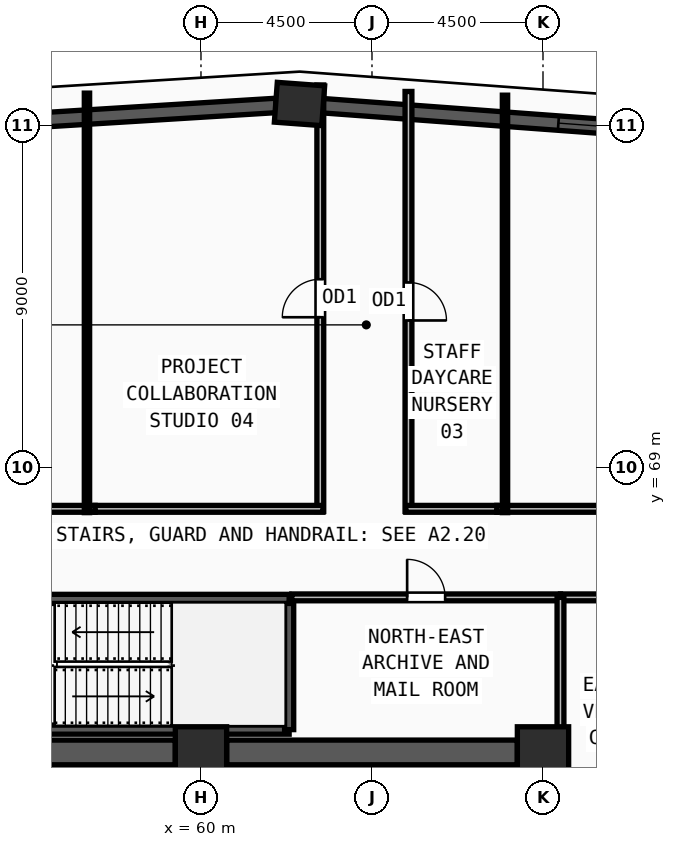
"""IFC4 building model, lengths in metres.
Left out: names, types, materials, properties, quantities, classifications, styles, units other than length and angle.
Written with IfcOpenShell. Run it as: python <this file> out.ifc"""

import sys

from ifc_helpers import new_model, si_unit, direction, frame, frame_2d, origin, origin_2d, place, context, subcontext, project, spatial, rectangle, extrude, source, transform, mapped, element, fill, save


model = new_model("IFC4")
c1 = context("Model", 3, precision=1e-05, world=origin(), true_north=direction((0.0, 1.0)))
c2 = subcontext(c1, "Body", "Model", "MODEL_VIEW")
j1 = project(units=[si_unit("LENGTHUNIT", "METRE"), si_unit("PLANEANGLEUNIT", "RADIAN")], contexts=[c1])
p1 = place(None, origin())
s1 = spatial("IfcSite", under=j1, at=p1, CompositionType="ELEMENT")
p2 = place(p1, origin())
s2 = spatial("IfcBuilding", under=s1, at=p2, CompositionType="ELEMENT")
p3 = place(p2, frame((0.0, 0.0, 201.75)))
s3 = spatial("IfcBuildingStorey", under=s2, at=p3, CompositionType="ELEMENT", Elevation=201.75)
m1 = source(origin(), c2, "Body", "SweptSolid", [
    extrude(rectangle(XDim=1.35, YDim=1.35, at=origin_2d()), origin(), (0.0, 0.0, 1.0), 3.75),
])
for number, where, z_axis, x_axis in (
    (1, (69.0, 61.5, 0.0), (0.0, 0.0, 1.0), (1.0, 0.0, 0.0)),
    (2, (60.0, 61.5, 0.0), (0.0, 0.0, 1.0), (1.0, 0.0, 0.0)),
):
    element("IfcColumn", number, at=place(p3, frame(where, z_axis=z_axis, x_axis=x_axis)), inside=s3, PredefinedType="COLUMN", context=c2, shape_type="MappedRepresentation", body=[
        mapped(m1, transform((0.0, 0.0, 0.0), x_axis=(1.0, 0.0, 0.0), y_axis=(0.0, 1.0, 0.0), z_axis=(0.0, 0.0, 1.0), scale=1.0)),
    ])
m2 = source(origin(), c2, "Body", "SweptSolid", [
    extrude(rectangle(XDim=1.25, YDim=1.05, at=origin_2d()), origin(), (0.0, 0.0, 1.0), 3.75),
])
p4 = place(p3, frame((62.593, 78.562, 0.0), z_axis=(0.0, 0.0, 1.0), x_axis=(-0.997288851512, 0.073586321085, 0.0)))
e3 = element("IfcColumn", 3, at=p4, inside=s3, PredefinedType="COLUMN", context=c2, shape_type="MappedRepresentation", body=[
    mapped(m2, transform((0.0, 0.0, 0.0), x_axis=(1.0, 0.0, 0.0), y_axis=(0.0, 1.0, 0.0), z_axis=(0.0, 0.0, 1.0), scale=1.0)),
])
p5 = place(p3, frame((87.605, 76.715, 0.0), z_axis=(0.0, 0.0, 1.0), x_axis=(-0.997283768188, 0.073655181142, 0.0)))
e4 = element("IfcWall", 4, at=p5, inside=s3, PredefinedType="SOLIDWALL", context=c2, shape_type="SweptSolid", body=[
    extrude(rectangle(XDim=24.465, YDim=0.38, at=frame_2d((12.233, 0.0))), origin(), (0.0, 0.0, 1.0), 3.57),
])
m3 = source(origin(), c2, "Body", "SweptSolid", [
    extrude(rectangle(XDim=1.5, YDim=1.9, at=frame_2d((0.75, 0.95))), frame((0.0, 0.2, 0.0), z_axis=(0.0, -1.0, 0.0), x_axis=(1.0, 0.0, 0.0)), (0.0, 0.0, 1.0), 0.4),
])
p6 = place(p5, frame((5.366, 0.0, 0.55)))
e5 = element("IfcOpeningElement", 5, at=p6, cuts=e4, PredefinedType="OPENING", context=c2, shape_type="MappedRepresentation", body=[
    mapped(m3, transform((0.0, 0.0, 0.0), x_axis=(1.0, 0.0, 0.0), y_axis=(0.0, 1.0, 0.0), z_axis=(0.0, 0.0, 1.0), scale=1.0)),
])
p7 = place(p5, frame((11.483, 0.0, 0.55)))
e6 = element("IfcOpeningElement", 6, at=p7, cuts=e4, PredefinedType="OPENING", context=c2, shape_type="MappedRepresentation", body=[
    mapped(m3, transform((0.0, 0.0, 0.0), x_axis=(1.0, 0.0, 0.0), y_axis=(0.0, 1.0, 0.0), z_axis=(0.0, 0.0, 1.0), scale=1.0)),
])
p8 = place(p5, frame((16.749, 0.0, 0.55)))
e7 = element("IfcOpeningElement", 7, at=p8, cuts=e4, PredefinedType="OPENING", context=c2, shape_type="MappedRepresentation", body=[
    mapped(m3, transform((0.0, 0.0, 0.0), x_axis=(1.0, 0.0, 0.0), y_axis=(0.0, 1.0, 0.0), z_axis=(0.0, 0.0, 1.0), scale=1.0)),
])
p9 = place(p3, frame((61.979, 78.524, 0.0), z_axis=(0.0, 0.0, 1.0), x_axis=(-0.998104910724, -0.061535251593, 0.0)))
e8 = element("IfcWall", 8, at=p9, inside=s3, PredefinedType="SOLIDWALL", context=c2, shape_type="SweptSolid", body=[
    extrude(rectangle(XDim=29.641, YDim=0.38, at=frame_2d((14.821, 0.0))), origin(), (0.0, 0.0, 1.0), 3.57),
])
p10 = place(p9, frame((6.66, 0.0, 0.55)))
e9 = element("IfcOpeningElement", 9, at=p10, cuts=e8, PredefinedType="OPENING", context=c2, shape_type="MappedRepresentation", body=[
    mapped(m3, transform((0.0, 0.0, 0.0), x_axis=(1.0, 0.0, 0.0), y_axis=(0.0, 1.0, 0.0), z_axis=(0.0, 0.0, 1.0), scale=1.0)),
])
p11 = place(p9, frame((14.071, 0.0, 0.55)))
e10 = element("IfcOpeningElement", 10, at=p11, cuts=e8, PredefinedType="OPENING", context=c2, shape_type="MappedRepresentation", body=[
    mapped(m3, transform((0.0, 0.0, 0.0), x_axis=(1.0, 0.0, 0.0), y_axis=(0.0, 1.0, 0.0), z_axis=(0.0, 0.0, 1.0), scale=1.0)),
])
p12 = place(p9, frame((21.481, 0.0, 0.55)))
e11 = element("IfcOpeningElement", 11, at=p12, cuts=e8, PredefinedType="OPENING", context=c2, shape_type="MappedRepresentation", body=[
    mapped(m3, transform((0.0, 0.0, 0.0), x_axis=(1.0, 0.0, 0.0), y_axis=(0.0, 1.0, 0.0), z_axis=(0.0, 0.0, 1.0), scale=1.0)),
])
for number, where, z_axis, x_axis in (
    (12, (51.675, 61.5, 0.0), (0.0, 0.0, 1.0), (1.0, 0.0, 0.0)),
    (13, (60.675, 61.5, 0.0), (0.0, 0.0, 1.0), (1.0, 0.0, 0.0)),
):
    element("IfcWall", number, at=place(p3, frame(where, z_axis=z_axis, x_axis=x_axis)), inside=s3, PredefinedType="SHEAR", context=c2, shape_type="SweptSolid", body=[
        extrude(rectangle(XDim=7.65, YDim=0.65, at=frame_2d((3.825, 0.0))), origin(), (0.0, 0.0, 1.0), 3.57),
    ])
p13 = place(p3, frame((54.5, 62.1, 0.0), z_axis=(0.0, 0.0, 1.0), x_axis=(1.0, 0.0, 0.0)))
e14 = element("IfcWall", 14, at=p13, inside=s3, PredefinedType="SOLIDWALL", context=c2, shape_type="SweptSolid", body=[
    extrude(rectangle(XDim=7.82, YDim=0.24, at=frame_2d((3.91, 0.0))), origin(), (0.0, 0.0, 1.0), 3.57),
])
p14 = place(p3, frame((62.32, 62.1, 0.0), z_axis=(0.0, 0.0, 1.0), x_axis=(0.0, 1.0, 0.0)))
e15 = element("IfcWall", 15, at=p14, inside=s3, PredefinedType="SOLIDWALL", context=c2, shape_type="SweptSolid", body=[
    extrude(rectangle(XDim=3.44, YDim=0.24, at=frame_2d((1.72, 0.0))), origin(), (0.0, 0.0, 1.0), 3.57),
])
p15 = place(p3, frame((62.32, 65.54, 0.0), z_axis=(0.0, 0.0, 1.0), x_axis=(-1.0, 0.0, 0.0)))
e16 = element("IfcWall", 16, at=p15, inside=s3, PredefinedType="SOLIDWALL", context=c2, shape_type="SweptSolid", body=[
    extrude(rectangle(XDim=7.82, YDim=0.24, at=frame_2d((3.91, 0.0))), origin(), (0.0, 0.0, 1.0), 3.57),
])
m4 = source(origin(), c2, "Body", "SweptSolid", [
    extrude(rectangle(XDim=1.2, YDim=2.2, at=frame_2d((0.6, 1.1))), frame((0.0, 0.13, 0.0), z_axis=(0.0, -1.0, 0.0), x_axis=(1.0, 0.0, 0.0)), (0.0, 0.0, 1.0), 0.26),
])
p16 = place(p15, frame((6.3, 0.0, 0.0)))
e17 = element("IfcOpeningElement", 17, at=p16, cuts=e16, PredefinedType="OPENING", context=c2, shape_type="MappedRepresentation", body=[
    mapped(m4, transform((0.0, 0.0, 0.0), x_axis=(1.0, 0.0, 0.0), y_axis=(0.0, 1.0, 0.0), z_axis=(0.0, 0.0, 1.0), scale=1.0)),
])
p17 = place(p3, frame((62.39, 65.58, 0.0), z_axis=(0.0, 0.0, 1.0), x_axis=(1.0, 0.0, 0.0)))
e18 = element("IfcWall", 18, at=p17, inside=s3, PredefinedType="PARTITIONING", context=c2, shape_type="SweptSolid", body=[
    extrude(rectangle(XDim=7.07, YDim=0.18, at=frame_2d((3.535, 0.0))), origin(), (0.0, 0.0, 1.0), 3.57),
])
m5 = source(origin(), c2, "Body", "SweptSolid", [
    extrude(rectangle(XDim=1.0, YDim=2.2, at=frame_2d((0.5, 1.1))), frame((0.0, 0.1, 0.0), z_axis=(0.0, -1.0, 0.0), x_axis=(1.0, 0.0, 0.0)), (0.0, 0.0, 1.0), 0.2),
])
p18 = place(p17, frame((3.035, 0.0, 0.0)))
e19 = element("IfcOpeningElement", 19, at=p18, cuts=e18, PredefinedType="OPENING", context=c2, shape_type="MappedRepresentation", body=[
    mapped(m5, transform((0.0, 0.0, 0.0), x_axis=(1.0, 0.0, 0.0), y_axis=(0.0, 1.0, 0.0), z_axis=(0.0, 0.0, 1.0), scale=1.0)),
])
p19 = place(p3, frame((69.46, 65.58, 0.0), z_axis=(0.0, 0.0, 1.0), x_axis=(1.0, 0.0, 0.0)))
e20 = element("IfcWall", 20, at=p19, inside=s3, PredefinedType="PARTITIONING", context=c2, shape_type="SweptSolid", body=[
    extrude(rectangle(XDim=3.84, YDim=0.18, at=frame_2d((1.92, 0.0))), origin(), (0.0, 0.0, 1.0), 3.57),
])
m6 = source(origin(), c2, "Body", "SweptSolid", [
    extrude(rectangle(XDim=1.3, YDim=2.2, at=frame_2d((0.65, 1.1))), frame((0.0, 0.1, 0.0), z_axis=(0.0, -1.0, 0.0), x_axis=(1.0, 0.0, 0.0)), (0.0, 0.0, 1.0), 0.2),
])
p20 = place(p19, frame((1.27, 0.0, 0.0)))
e21 = element("IfcOpeningElement", 21, at=p20, cuts=e20, PredefinedType="OPENING", context=c2, shape_type="MappedRepresentation", body=[
    mapped(m6, transform((0.0, 0.0, 0.0), x_axis=(1.0, 0.0, 0.0), y_axis=(0.0, 1.0, 0.0), z_axis=(0.0, 0.0, 1.0), scale=1.0)),
])
p21 = place(p3, frame((67.785, 67.91, 0.0), z_axis=(0.0, 0.0, 1.0), x_axis=(1.0, 0.0, 0.0)))
e22 = element("IfcWall", 22, at=p21, inside=s3, PredefinedType="PARTITIONING", context=c2, shape_type="SweptSolid", body=[
    extrude(rectangle(XDim=7.845, YDim=0.18, at=frame_2d((3.922, 0.0))), origin(), (0.0, 0.0, 1.0), 3.57),
])
m7 = source(origin(), c2, "Body", "SweptSolid", [
    extrude(rectangle(XDim=1.5, YDim=2.2, at=frame_2d((0.75, 1.1))), frame((0.0, 0.1, 0.0), z_axis=(0.0, -1.0, 0.0), x_axis=(1.0, 0.0, 0.0)), (0.0, 0.0, 1.0), 0.2),
])
p22 = place(p21, frame((3.172, 0.0, 0.0)))
e23 = element("IfcOpeningElement", 23, at=p22, cuts=e22, PredefinedType="OPENING", context=c2, shape_type="MappedRepresentation", body=[
    mapped(m7, transform((0.0, 0.0, 0.0), x_axis=(1.0, 0.0, 0.0), y_axis=(0.0, 1.0, 0.0), z_axis=(0.0, 0.0, 1.0), scale=1.0)),
])
p23 = place(p3, frame((65.46, 78.892, 0.0), z_axis=(0.0, 0.0, 1.0), x_axis=(0.0, -1.0, 0.0)))
e24 = element("IfcWall", 24, at=p23, inside=s3, PredefinedType="PARTITIONING", context=c2, shape_type="SweptSolid", body=[
    extrude(rectangle(XDim=11.052, YDim=0.18, at=frame_2d((5.526, 0.0))), origin(), (0.0, 0.0, 1.0), 3.57),
])
p24 = place(p23, frame((5.026, 0.0, 0.0)))
e25 = element("IfcOpeningElement", 25, at=p24, cuts=e24, PredefinedType="OPENING", context=c2, shape_type="MappedRepresentation", body=[
    mapped(m5, transform((0.0, 0.0, 0.0), x_axis=(1.0, 0.0, 0.0), y_axis=(0.0, 1.0, 0.0), z_axis=(0.0, 0.0, 1.0), scale=1.0)),
])
p25 = place(p3, frame((63.14, 67.84, 0.0), z_axis=(0.0, 0.0, 1.0), x_axis=(0.0, 1.0, 0.0)))
e26 = element("IfcWall", 26, at=p25, inside=s3, PredefinedType="PARTITIONING", context=c2, shape_type="SweptSolid", body=[
    extrude(rectangle(XDim=11.223, YDim=0.18, at=frame_2d((5.611, 0.0))), origin(), (0.0, 0.0, 1.0), 3.57),
])
p26 = place(p25, frame((5.111, 0.0, 0.0)))
e27 = element("IfcOpeningElement", 27, at=p26, cuts=e26, PredefinedType="OPENING", context=c2, shape_type="MappedRepresentation", body=[
    mapped(m5, transform((0.0, 0.0, 0.0), x_axis=(1.0, 0.0, 0.0), y_axis=(0.0, 1.0, 0.0), z_axis=(0.0, 0.0, 1.0), scale=1.0)),
])
p27 = place(p3, frame((44.37, 67.91, 0.0), z_axis=(0.0, 0.0, 1.0), x_axis=(1.0, 0.0, 0.0)))
e28 = element("IfcWall", 28, at=p27, inside=s3, PredefinedType="PARTITIONING", context=c2, shape_type="SweptSolid", body=[
    extrude(rectangle(XDim=12.845, YDim=0.18, at=frame_2d((6.422, 0.0))), origin(), (0.0, 0.0, 1.0), 3.57),
])
p28 = place(p27, frame((5.673, 0.0, 0.0)))
e29 = element("IfcOpeningElement", 29, at=p28, cuts=e28, PredefinedType="OPENING", context=c2, shape_type="MappedRepresentation", body=[
    mapped(m7, transform((0.0, 0.0, 0.0), x_axis=(1.0, 0.0, 0.0), y_axis=(0.0, 1.0, 0.0), z_axis=(0.0, 0.0, 1.0), scale=1.0)),
])
p29 = place(p3, frame((69.46, 61.95, 0.0), z_axis=(0.0, 0.0, 1.0), x_axis=(0.0, 1.0, 0.0)))
e30 = element("IfcWall", 30, at=p29, inside=s3, PredefinedType="PARTITIONING", context=c2, shape_type="SweptSolid", body=[
    extrude(rectangle(XDim=3.63, YDim=0.18, at=frame_2d((1.815, 0.0))), origin(), (0.0, 0.0, 1.0), 3.57),
])
p30 = place(p3, frame((65.39, 67.91, 0.0), z_axis=(0.0, 0.0, 1.0), x_axis=(1.0, 0.0, 0.0)))
e31 = element("IfcWall", 31, at=p30, inside=s3, PredefinedType="PARTITIONING", context=c2, shape_type="SweptSolid", body=[
    extrude(rectangle(XDim=2.395, YDim=0.18, at=frame_2d((1.198, 0.0))), origin(), (0.0, 0.0, 1.0), 3.57),
])
p31 = place(p3, frame((57.215, 67.91, 0.0), z_axis=(0.0, 0.0, 1.0), x_axis=(1.0, 0.0, 0.0)))
e32 = element("IfcWall", 32, at=p31, inside=s3, PredefinedType="PARTITIONING", context=c2, shape_type="SweptSolid", body=[
    extrude(rectangle(XDim=5.995, YDim=0.18, at=frame_2d((2.998, 0.0))), origin(), (0.0, 0.0, 1.0), 3.57),
])
p32 = place(p3, frame((57.0, 67.81, 0.0), z_axis=(0.0, 0.0, 1.0), x_axis=(0.0, 1.0, 0.0)))
e33 = element("IfcWall", 33, at=p32, inside=s3, PredefinedType="PARTITIONING", context=c2, shape_type="SweptSolid", body=[
    extrude(rectangle(XDim=11.038, YDim=0.14, at=frame_2d((5.519, 0.0))), origin(), (0.0, 0.0, 1.0), 3.57),
])
p33 = place(p3, frame((68.0, 67.81, 0.0), z_axis=(0.0, 0.0, 1.0), x_axis=(0.0, 1.0, 0.0)))
e34 = element("IfcWall", 34, at=p33, inside=s3, PredefinedType="PARTITIONING", context=c2, shape_type="SweptSolid", body=[
    extrude(rectangle(XDim=10.984, YDim=0.14, at=frame_2d((5.492, 0.0))), origin(), (0.0, 0.0, 1.0), 3.57),
])
m8 = source(origin(), c2, "Body", "SweptSolid", [
    extrude(rectangle(XDim=1.5, YDim=1.9, at=frame_2d((0.75, 0.95))), frame((0.0, 0.03, 0.0), z_axis=(0.0, -1.0, 0.0), x_axis=(1.0, 0.0, 0.0)), (0.0, 0.0, 1.0), 0.06),
])
p34 = place(p8, origin())
e35 = element("IfcWindow", 35, at=p34, inside=s3, PartitioningType="DOUBLE_PANEL_VERTICAL", PredefinedType="WINDOW", context=c2, shape_type="MappedRepresentation", body=[
    mapped(m8, transform((0.0, 0.0, 0.0), x_axis=(1.0, 0.0, 0.0), y_axis=(0.0, 1.0, 0.0), z_axis=(0.0, 0.0, 1.0), scale=1.0)),
])
fill(e7, e35)
m9 = source(origin(), c2, "Body", "SweptSolid", [
    extrude(rectangle(XDim=1.0, YDim=2.2, at=frame_2d((0.5, 1.1))), frame((0.0, 0.025, 0.0), z_axis=(0.0, -1.0, 0.0), x_axis=(1.0, 0.0, 0.0)), (0.0, 0.0, 1.0), 0.05),
])
p35 = place(p18, origin())
e36 = element("IfcDoor", 36, at=p35, inside=s3, OperationType="SINGLE_SWING_LEFT", PredefinedType="DOOR", context=c2, shape_type="MappedRepresentation", body=[
    mapped(m9, transform((0.0, 0.0, 0.0), x_axis=(1.0, 0.0, 0.0), y_axis=(0.0, 1.0, 0.0), z_axis=(0.0, 0.0, 1.0), scale=1.0)),
])
fill(e19, e36)
p36 = place(p24, origin())
e37 = element("IfcDoor", 37, at=p36, inside=s3, OperationType="SINGLE_SWING_RIGHT", PredefinedType="DOOR", context=c2, shape_type="MappedRepresentation", body=[
    mapped(m9, transform((0.0, 0.0, 0.0), x_axis=(1.0, 0.0, 0.0), y_axis=(0.0, 1.0, 0.0), z_axis=(0.0, 0.0, 1.0), scale=1.0)),
])
fill(e25, e37)
p37 = place(p26, origin())
e38 = element("IfcDoor", 38, at=p37, inside=s3, OperationType="SINGLE_SWING_LEFT", PredefinedType="DOOR", context=c2, shape_type="MappedRepresentation", body=[
    mapped(m9, transform((0.0, 0.0, 0.0), x_axis=(1.0, 0.0, 0.0), y_axis=(0.0, 1.0, 0.0), z_axis=(0.0, 0.0, 1.0), scale=1.0)),
])
fill(e27, e38)
save(model, sys.argv[1])
